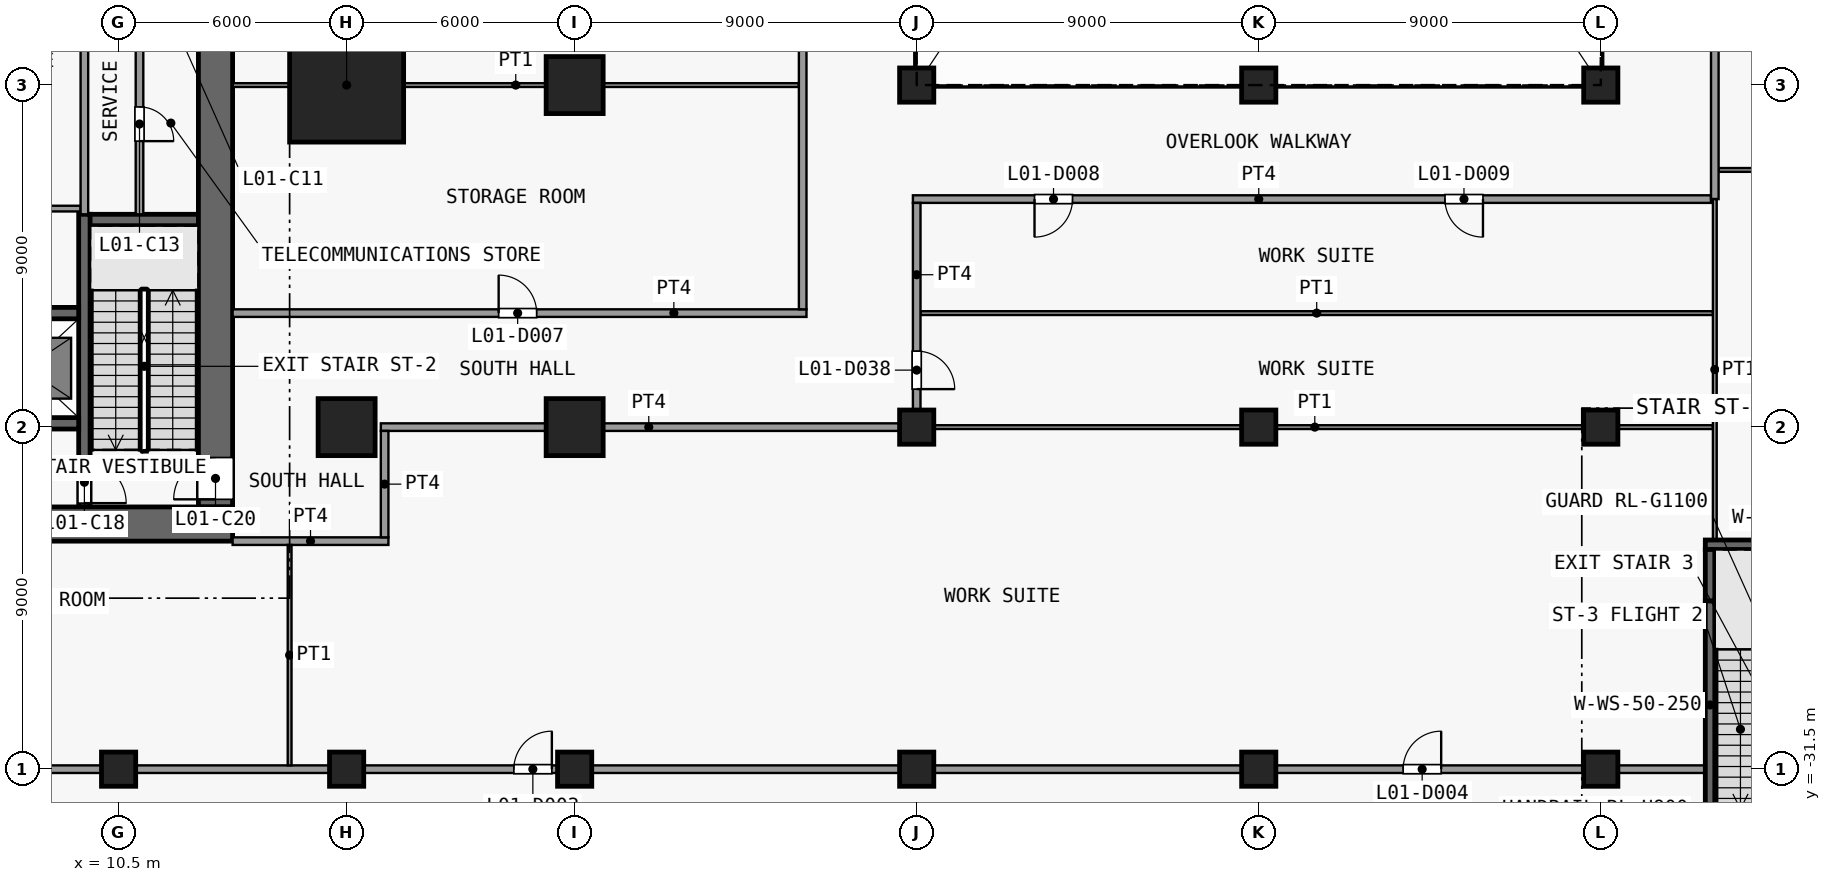
"""IFC4 building model, lengths in metres.
Left out: names, types, materials, properties, quantities, classifications, styles, units other than length and angle.
Written with IfcOpenShell. Run it as: python <this file> out.ifc"""

import sys

from ifc_helpers import new_model, si_unit, direction, frame, frame_2d, origin, origin_2d, place, context, subcontext, project, spatial, rectangle, extrude, element, fill, save


model = new_model("IFC4")
c1 = context("Model", 3, precision=1e-05, world=origin(), true_north=direction((0.0, 1.0)))
c2 = subcontext(c1, "Body", "Model", "MODEL_VIEW")
j1 = project(units=[si_unit("LENGTHUNIT", "METRE"), si_unit("PLANEANGLEUNIT", "RADIAN")], contexts=[c1])
p1 = place(None, origin())
s1 = spatial("IfcSite", under=j1, at=p1, CompositionType="ELEMENT")
p2 = place(p1, origin())
s2 = spatial("IfcBuilding", under=s1, at=p2, CompositionType="ELEMENT")
p3 = place(p2, frame((0.0, 0.0, 8.0)))
s3 = spatial("IfcBuildingStorey", under=s2, at=p3, CompositionType="ELEMENT", Elevation=8.0)
for number, where, z_axis, x_axis in (
    (1, (10.5, -31.5, 0.0), (0.0, 0.0, 1.0), (1.0, 0.0, 0.0)),
    (2, (16.5, -31.5, 0.0), (0.0, 0.0, 1.0), (1.0, 0.0, 0.0)),
):
    element("IfcColumn", number, at=place(p3, frame(where, z_axis=z_axis, x_axis=x_axis)), inside=s3, PredefinedType="COLUMN", context=c2, shape_type="SweptSolid", body=[
        extrude(rectangle(XDim=0.9, YDim=0.9, at=origin_2d()), origin(), (0.0, 0.0, 1.0), 5.5),
    ])
p4 = place(p3, frame((16.5, -22.5, 0.0), z_axis=(0.0, 0.0, 1.0), x_axis=(1.0, 0.0, 0.0)))
e3 = element("IfcColumn", 3, at=p4, inside=s3, PredefinedType="COLUMN", context=c2, shape_type="SweptSolid", body=[
    extrude(rectangle(XDim=1.5, YDim=1.5, at=origin_2d()), origin(), (0.0, 0.0, 1.0), 5.5),
])
p5 = place(p3, frame((16.5, -13.5, 0.0), z_axis=(0.0, 0.0, 1.0), x_axis=(1.0, 0.0, 0.0)))
e4 = element("IfcColumn", 4, at=p5, inside=s3, PredefinedType="COLUMN", context=c2, shape_type="SweptSolid", body=[
    extrude(rectangle(XDim=3.0, YDim=3.0, at=origin_2d()), origin(), (0.0, 0.0, 1.0), 5.5),
])
p6 = place(p3, frame((22.5, -31.5, 0.0), z_axis=(0.0, 0.0, 1.0), x_axis=(1.0, 0.0, 0.0)))
e5 = element("IfcColumn", 5, at=p6, inside=s3, PredefinedType="COLUMN", context=c2, shape_type="SweptSolid", body=[
    extrude(rectangle(XDim=0.9, YDim=0.9, at=origin_2d()), origin(), (0.0, 0.0, 1.0), 5.5),
])
for number, where, z_axis, x_axis in (
    (6, (22.5, -22.5, 0.0), (0.0, 0.0, 1.0), (1.0, 0.0, 0.0)),
    (7, (22.5, -13.5, 0.0), (0.0, 0.0, 1.0), (1.0, 0.0, 0.0)),
):
    element("IfcColumn", number, at=place(p3, frame(where, z_axis=z_axis, x_axis=x_axis)), inside=s3, PredefinedType="COLUMN", context=c2, shape_type="SweptSolid", body=[
        extrude(rectangle(XDim=1.5, YDim=1.5, at=origin_2d()), origin(), (0.0, 0.0, 1.0), 5.5),
    ])
for number, where, z_axis, x_axis in (
    (8, (31.5, -31.5, 0.0), (0.0, 0.0, 1.0), (1.0, 0.0, 0.0)),
    (9, (31.5, -22.5, 0.0), (0.0, 0.0, 1.0), (1.0, 0.0, 0.0)),
    (10, (31.5, -13.5, 0.0), (0.0, 0.0, 1.0), (1.0, 0.0, 0.0)),
    (11, (40.5, -31.5, 0.0), (0.0, 0.0, 1.0), (1.0, 0.0, 0.0)),
    (12, (40.5, -22.5, 0.0), (0.0, 0.0, 1.0), (1.0, 0.0, 0.0)),
    (13, (40.5, -13.5, 0.0), (0.0, 0.0, 1.0), (1.0, 0.0, 0.0)),
    (14, (49.5, -31.5, 0.0), (0.0, 0.0, 1.0), (1.0, 0.0, 0.0)),
    (15, (49.5, -22.5, 0.0), (0.0, 0.0, 1.0), (1.0, 0.0, 0.0)),
    (16, (49.5, -13.5, 0.0), (0.0, 0.0, 1.0), (1.0, 0.0, 0.0)),
):
    element("IfcColumn", number, at=place(p3, frame(where, z_axis=z_axis, x_axis=x_axis)), inside=s3, PredefinedType="COLUMN", context=c2, shape_type="SweptSolid", body=[
        extrude(rectangle(XDim=0.9, YDim=0.9, at=origin_2d()), origin(), (0.0, 0.0, 1.0), 5.5),
    ])
p7 = place(p3, frame((-13.5, -25.05, 0.0), z_axis=(0.0, 0.0, 1.0), x_axis=(1.0, 0.0, 0.0)))
e17 = element("IfcWall", 17, at=p7, inside=s3, PredefinedType="SHEAR", context=c2, shape_type="SweptSolid", body=[
    extrude(rectangle(XDim=27.0, YDim=0.9, at=frame_2d((13.5, 0.0))), origin(), (0.0, 0.0, 1.0), 5.15),
])
p8 = place(p3, frame((13.05, -24.6, 0.0), z_axis=(0.0, 0.0, 1.0), x_axis=(0.0, 1.0, 0.0)))
e18 = element("IfcWall", 18, at=p8, inside=s3, PredefinedType="SHEAR", context=c2, shape_type="SweptSolid", body=[
    extrude(rectangle(XDim=16.1, YDim=0.9, at=frame_2d((8.05, 0.0))), origin(), (0.0, 0.0, 1.0), 5.15),
])
p9 = place(p8, frame((0.2, 0.0, 0.0)))
e19 = element("IfcOpeningElement", 19, at=p9, cuts=e18, PredefinedType="OPENING", context=c2, shape_type="SweptSolid", body=[
    extrude(rectangle(XDim=1.1, YDim=2.1, at=frame_2d((0.55, 1.05))), frame((0.0, 0.46, 0.0), z_axis=(0.0, -1.0, 0.0), x_axis=(1.0, 0.0, 0.0)), (0.0, 0.0, 1.0), 0.92),
])
p10 = place(p3, frame((6.35, -22.4, 0.0), z_axis=(0.0, 0.0, 1.0), x_axis=(1.0, 0.0, 0.0)))
e20 = element("IfcWall", 20, at=p10, inside=s3, PredefinedType="SHEAR", context=c2, shape_type="SweptSolid", body=[
    extrude(rectangle(XDim=3.1, YDim=0.3, at=frame_2d((1.55, 0.0))), origin(), (0.0, 0.0, 1.0), 5.15),
])
p11 = place(p3, frame((6.425, -19.5, 0.0), z_axis=(0.0, 0.0, 1.0), x_axis=(1.0, 0.0, 0.0)))
e21 = element("IfcWall", 21, at=p11, inside=s3, PredefinedType="SHEAR", context=c2, shape_type="SweptSolid", body=[
    extrude(rectangle(XDim=3.025, YDim=0.3, at=frame_2d((1.512, 0.0))), origin(), (0.0, 0.0, 1.0), 5.15),
])
p12 = place(p3, frame((9.5, -17.05, 0.0), z_axis=(0.0, 0.0, 1.0), x_axis=(1.0, 0.0, 0.0)))
e22 = element("IfcWall", 22, at=p12, inside=s3, PredefinedType="SHEAR", context=c2, shape_type="SweptSolid", body=[
    extrude(rectangle(XDim=3.1, YDim=0.3, at=frame_2d((1.55, 0.0))), origin(), (0.0, 0.0, 1.0), 5.15),
])
p13 = place(p3, frame((6.575, -16.75, 0.0), z_axis=(0.0, 0.0, 1.0), x_axis=(1.0, 0.0, 0.0)))
e23 = element("IfcWall", 23, at=p13, inside=s3, PredefinedType="PARTITIONING", context=c2, shape_type="SweptSolid", body=[
    extrude(rectangle(XDim=2.925, YDim=0.15, at=frame_2d((1.462, 0.0))), origin(), (0.0, 0.0, 1.0), 5.15),
])
p14 = place(p3, frame((9.6, -16.9, 0.0), z_axis=(0.0, 0.0, 1.0), x_axis=(0.0, -1.0, 0.0)))
e24 = element("IfcWall", 24, at=p14, inside=s3, PredefinedType="SHEAR", context=c2, shape_type="SweptSolid", body=[
    extrude(rectangle(XDim=7.7, YDim=0.3, at=frame_2d((3.85, 0.0))), origin(), (0.0, 0.0, 1.0), 5.15),
])
p15 = place(p14, frame((6.5, 0.0, 0.0)))
e25 = element("IfcOpeningElement", 25, at=p15, cuts=e24, PredefinedType="OPENING", context=c2, shape_type="SweptSolid", body=[
    extrude(rectangle(XDim=1.1, YDim=2.1, at=frame_2d((0.55, 1.05))), frame((0.0, 0.16, 0.0), z_axis=(0.0, -1.0, 0.0), x_axis=(1.0, 0.0, 0.0)), (0.0, 0.0, 1.0), 0.32),
])
p16 = place(p3, frame((9.6, -16.9, 0.0), z_axis=(0.0, 0.0, 1.0), x_axis=(0.0, 1.0, 0.0)))
e26 = element("IfcWall", 26, at=p16, inside=s3, PredefinedType="PARTITIONING", context=c2, shape_type="SweptSolid", body=[
    extrude(rectangle(XDim=8.4, YDim=0.2, at=frame_2d((4.2, 0.0))), origin(), (0.0, 0.0, 1.0), 5.15),
])
p17 = place(p3, frame((11.05, -11.9, 0.0), z_axis=(0.0, 0.0, 1.0), x_axis=(0.0, -1.0, 0.0)))
e27 = element("IfcWall", 27, at=p17, inside=s3, PredefinedType="PARTITIONING", context=c2, shape_type="SweptSolid", body=[
    extrude(rectangle(XDim=5.0, YDim=0.2, at=frame_2d((2.5, 0.0))), origin(), (0.0, 0.0, 1.0), 5.15),
])
p18 = place(p17, frame((2.175, 0.0, 0.0)))
e28 = element("IfcOpeningElement", 28, at=p18, cuts=e27, PredefinedType="OPENING", context=c2, shape_type="SweptSolid", body=[
    extrude(rectangle(XDim=0.9, YDim=2.1, at=frame_2d((0.45, 1.05))), frame((0.0, 0.11, 0.0), z_axis=(0.0, -1.0, 0.0), x_axis=(1.0, 0.0, 0.0)), (0.0, 0.0, 1.0), 0.22),
])
p19 = place(p3, frame((52.375, -32.55, 0.0), z_axis=(0.0, 0.0, 1.0), x_axis=(0.0, 1.0, 0.0)))
e29 = element("IfcWall", 29, at=p19, inside=s3, PredefinedType="SHEAR", context=c2, shape_type="SweptSolid", body=[
    extrude(rectangle(XDim=5.48, YDim=0.25, at=frame_2d((2.74, 0.0))), origin(), (0.0, 0.0, 1.0), 5.15),
])
p20 = place(p3, frame((52.375, -27.07, 0.0), z_axis=(0.0, 0.0, 1.0), x_axis=(0.0, 1.0, 0.0)))
e30 = element("IfcWall", 30, at=p20, inside=s3, PredefinedType="SHEAR", context=c2, shape_type="SweptSolid", body=[
    extrude(rectangle(XDim=1.35, YDim=0.25, at=frame_2d((0.675, 0.0))), origin(), (0.0, 0.0, 1.0), 5.15),
])
p21 = place(p3, frame((52.25, -25.595, 0.0), z_axis=(0.0, 0.0, 1.0), x_axis=(1.0, 0.0, 0.0)))
e31 = element("IfcWall", 31, at=p21, inside=s3, PredefinedType="SHEAR", context=c2, shape_type="SweptSolid", body=[
    extrude(rectangle(XDim=3.35, YDim=0.25, at=frame_2d((1.675, 0.0))), origin(), (0.0, 0.0, 1.0), 5.15),
])
p22 = place(p3, frame((-25.9, -31.5, 0.0), z_axis=(0.0, 0.0, 1.0), x_axis=(1.0, 0.0, 0.0)))
e32 = element("IfcWall", 32, at=p22, inside=s3, PredefinedType="PARTITIONING", context=c2, shape_type="SweptSolid", body=[
    extrude(rectangle(XDim=78.15, YDim=0.2, at=frame_2d((39.075, 0.0))), origin(), (0.0, 0.0, 1.0), 5.15),
])
p23 = place(p22, frame((7.0, 0.0, 0.0)))
e33 = element("IfcOpeningElement", 33, at=p23, cuts=e32, PredefinedType="OPENING", context=c2, shape_type="SweptSolid", body=[
    extrude(rectangle(XDim=1.8, YDim=2.1, at=frame_2d((0.9, 1.05))), frame((0.0, 0.11, 0.0), z_axis=(0.0, -1.0, 0.0), x_axis=(1.0, 0.0, 0.0)), (0.0, 0.0, 1.0), 0.22),
])
p24 = place(p22, frame((31.8, 0.0, 0.0)))
e34 = element("IfcOpeningElement", 34, at=p24, cuts=e32, PredefinedType="OPENING", context=c2, shape_type="SweptSolid", body=[
    extrude(rectangle(XDim=1.8, YDim=2.1, at=frame_2d((0.9, 1.05))), frame((0.0, 0.11, 0.0), z_axis=(0.0, -1.0, 0.0), x_axis=(1.0, 0.0, 0.0)), (0.0, 0.0, 1.0), 0.22),
])
p25 = place(p22, frame((46.8, 0.0, 0.0)))
e35 = element("IfcOpeningElement", 35, at=p25, cuts=e32, PredefinedType="OPENING", context=c2, shape_type="SweptSolid", body=[
    extrude(rectangle(XDim=1.0, YDim=2.1, at=frame_2d((0.5, 1.05))), frame((0.0, 0.11, 0.0), z_axis=(0.0, -1.0, 0.0), x_axis=(1.0, 0.0, 0.0)), (0.0, 0.0, 1.0), 0.22),
])
p26 = place(p22, frame((70.2, 0.0, 0.0)))
e36 = element("IfcOpeningElement", 36, at=p26, cuts=e32, PredefinedType="OPENING", context=c2, shape_type="SweptSolid", body=[
    extrude(rectangle(XDim=1.0, YDim=2.1, at=frame_2d((0.5, 1.05))), frame((0.0, 0.11, 0.0), z_axis=(0.0, -1.0, 0.0), x_axis=(1.0, 0.0, 0.0)), (0.0, 0.0, 1.0), 0.22),
])
p27 = place(p3, frame((13.5, -25.5, 0.0), z_axis=(0.0, 0.0, 1.0), x_axis=(1.0, 0.0, 0.0)))
e37 = element("IfcWall", 37, at=p27, inside=s3, PredefinedType="PARTITIONING", context=c2, shape_type="SweptSolid", body=[
    extrude(rectangle(XDim=4.1, YDim=0.2, at=frame_2d((2.05, 0.0))), origin(), (0.0, 0.0, 1.0), 5.15),
])
p28 = place(p3, frame((17.4, -22.5, 0.0), z_axis=(0.0, 0.0, 1.0), x_axis=(1.0, 0.0, 0.0)))
e38 = element("IfcWall", 38, at=p28, inside=s3, PredefinedType="PARTITIONING", context=c2, shape_type="SweptSolid", body=[
    extrude(rectangle(XDim=14.1, YDim=0.2, at=frame_2d((7.05, 0.0))), origin(), (0.0, 0.0, 1.0), 5.15),
])
p29 = place(p3, frame((31.5, -22.5, 0.0), z_axis=(0.0, 0.0, 1.0), x_axis=(1.0, 0.0, 0.0)))
e39 = element("IfcWall", 39, at=p29, inside=s3, PredefinedType="PARTITIONING", context=c2, shape_type="SweptSolid", body=[
    extrude(rectangle(XDim=20.95, YDim=0.1, at=frame_2d((10.475, 0.0))), origin(), (0.0, 0.0, 1.0), 5.15),
])
p30 = place(p3, frame((13.5, -19.5, 0.0), z_axis=(0.0, 0.0, 1.0), x_axis=(1.0, 0.0, 0.0)))
e40 = element("IfcWall", 40, at=p30, inside=s3, PredefinedType="PARTITIONING", context=c2, shape_type="SweptSolid", body=[
    extrude(rectangle(XDim=15.1, YDim=0.2, at=frame_2d((7.55, 0.0))), origin(), (0.0, 0.0, 1.0), 5.15),
])
p31 = place(p30, frame((7.0, 0.0, 0.0)))
e41 = element("IfcOpeningElement", 41, at=p31, cuts=e40, PredefinedType="OPENING", context=c2, shape_type="SweptSolid", body=[
    extrude(rectangle(XDim=1.0, YDim=2.1, at=frame_2d((0.5, 1.05))), frame((0.0, 0.11, 0.0), z_axis=(0.0, -1.0, 0.0), x_axis=(1.0, 0.0, 0.0)), (0.0, 0.0, 1.0), 0.22),
])
p32 = place(p3, frame((31.6, -19.5, 0.0), z_axis=(0.0, 0.0, 1.0), x_axis=(1.0, 0.0, 0.0)))
e42 = element("IfcWall", 42, at=p32, inside=s3, PredefinedType="PARTITIONING", context=c2, shape_type="SweptSolid", body=[
    extrude(rectangle(XDim=20.85, YDim=0.1, at=frame_2d((10.425, 0.0))), origin(), (0.0, 0.0, 1.0), 5.15),
])
p33 = place(p3, frame((31.4, -16.5, 0.0), z_axis=(0.0, 0.0, 1.0), x_axis=(1.0, 0.0, 0.0)))
e43 = element("IfcWall", 43, at=p33, inside=s3, PredefinedType="PARTITIONING", context=c2, shape_type="SweptSolid", body=[
    extrude(rectangle(XDim=21.0, YDim=0.2, at=frame_2d((10.5, 0.0))), origin(), (0.0, 0.0, 1.0), 5.15),
])
p34 = place(p33, frame((3.2, 0.0, 0.0)))
e44 = element("IfcOpeningElement", 44, at=p34, cuts=e43, PredefinedType="OPENING", context=c2, shape_type="SweptSolid", body=[
    extrude(rectangle(XDim=1.0, YDim=2.1, at=frame_2d((0.5, 1.05))), frame((0.0, 0.11, 0.0), z_axis=(0.0, -1.0, 0.0), x_axis=(1.0, 0.0, 0.0)), (0.0, 0.0, 1.0), 0.22),
])
p35 = place(p33, frame((14.0, 0.0, 0.0)))
e45 = element("IfcOpeningElement", 45, at=p35, cuts=e43, PredefinedType="OPENING", context=c2, shape_type="SweptSolid", body=[
    extrude(rectangle(XDim=1.0, YDim=2.1, at=frame_2d((0.5, 1.05))), frame((0.0, 0.11, 0.0), z_axis=(0.0, -1.0, 0.0), x_axis=(1.0, 0.0, 0.0)), (0.0, 0.0, 1.0), 0.22),
])
p36 = place(p3, frame((52.6, -15.733, 0.0), z_axis=(0.0, 0.0, 1.0), x_axis=(1.0, 0.0, 0.0)))
e46 = element("IfcWall", 46, at=p36, inside=s3, PredefinedType="PARTITIONING", context=c2, shape_type="SweptSolid", body=[
    extrude(rectangle(XDim=5.8, YDim=0.1, at=frame_2d((2.9, 0.0))), origin(), (0.0, 0.0, 1.0), 5.15),
])
p37 = place(p3, frame((13.5, -13.5, 0.0), z_axis=(0.0, 0.0, 1.0), x_axis=(1.0, 0.0, 0.0)))
e47 = element("IfcWall", 47, at=p37, inside=s3, PredefinedType="PARTITIONING", context=c2, shape_type="SweptSolid", body=[
    extrude(rectangle(XDim=14.9, YDim=0.1, at=frame_2d((7.45, 0.0))), origin(), (0.0, 0.0, 1.0), 5.15),
])
p38 = place(p3, frame((15.0, -31.4, 0.0), z_axis=(0.0, 0.0, 1.0), x_axis=(0.0, 1.0, 0.0)))
e48 = element("IfcWall", 48, at=p38, inside=s3, PredefinedType="PARTITIONING", context=c2, shape_type="SweptSolid", body=[
    extrude(rectangle(XDim=5.8, YDim=0.1, at=frame_2d((2.9, 0.0))), origin(), (0.0, 0.0, 1.0), 5.15),
])
p39 = place(p3, frame((17.5, -25.4, 0.0), z_axis=(0.0, 0.0, 1.0), x_axis=(0.0, 1.0, 0.0)))
e49 = element("IfcWall", 49, at=p39, inside=s3, PredefinedType="PARTITIONING", context=c2, shape_type="SweptSolid", body=[
    extrude(rectangle(XDim=2.8, YDim=0.2, at=frame_2d((1.4, 0.0))), origin(), (0.0, 0.0, 1.0), 5.15),
])
p40 = place(p3, frame((28.5, -19.4, 0.0), z_axis=(0.0, 0.0, 1.0), x_axis=(0.0, 1.0, 0.0)))
e50 = element("IfcWall", 50, at=p40, inside=s3, PredefinedType="PARTITIONING", context=c2, shape_type="SweptSolid", body=[
    extrude(rectangle(XDim=14.8, YDim=0.2, at=frame_2d((7.4, 0.0))), origin(), (0.0, 0.0, 1.0), 5.15),
])
p41 = place(p3, frame((31.5, -22.4, 0.0), z_axis=(0.0, 0.0, 1.0), x_axis=(0.0, 1.0, 0.0)))
e51 = element("IfcWall", 51, at=p41, inside=s3, PredefinedType="PARTITIONING", context=c2, shape_type="SweptSolid", body=[
    extrude(rectangle(XDim=5.8, YDim=0.2, at=frame_2d((2.9, 0.0))), origin(), (0.0, 0.0, 1.0), 5.15),
])
p42 = place(p41, frame((0.9, 0.0, 0.0)))
e52 = element("IfcOpeningElement", 52, at=p42, cuts=e51, PredefinedType="OPENING", context=c2, shape_type="SweptSolid", body=[
    extrude(rectangle(XDim=1.0, YDim=2.1, at=frame_2d((0.5, 1.05))), frame((0.0, 0.11, 0.0), z_axis=(0.0, -1.0, 0.0), x_axis=(1.0, 0.0, 0.0)), (0.0, 0.0, 1.0), 0.22),
])
p43 = place(p3, frame((52.5, -16.5, 0.0), z_axis=(0.0, 0.0, 1.0), x_axis=(0.0, 1.0, 0.0)))
e53 = element("IfcWall", 53, at=p43, inside=s3, PredefinedType="PARTITIONING", context=c2, shape_type="SweptSolid", body=[
    extrude(rectangle(XDim=32.2, YDim=0.2, at=frame_2d((16.1, 0.0))), origin(), (0.0, 0.0, 1.0), 5.15),
])
p44 = place(p3, frame((52.5, -25.47, 0.0), z_axis=(0.0, 0.0, 1.0), x_axis=(0.0, 1.0, 0.0)))
e54 = element("IfcWall", 54, at=p44, inside=s3, PredefinedType="PARTITIONING", context=c2, shape_type="SweptSolid", body=[
    extrude(rectangle(XDim=8.97, YDim=0.1, at=frame_2d((4.485, 0.0))), origin(), (0.0, 0.0, 1.0), 5.15),
])
p45 = place(p18, origin())
e55 = element("IfcDoor", 55, at=p45, inside=s3, OperationType="SINGLE_SWING_RIGHT", PredefinedType="DOOR", context=c2, shape_type="SweptSolid", body=[
    extrude(rectangle(XDim=0.9, YDim=2.1, at=frame_2d((0.45, 1.05))), frame((0.0, 0.025, 0.0), z_axis=(0.0, -1.0, 0.0), x_axis=(1.0, 0.0, 0.0)), (0.0, 0.0, 1.0), 0.05),
])
fill(e28, e55)
p46 = place(p15, origin())
e56 = element("IfcDoor", 56, at=p46, inside=s3, OperationType="SINGLE_SWING_RIGHT", PredefinedType="DOOR", context=c2, shape_type="SweptSolid", body=[
    extrude(rectangle(XDim=1.1, YDim=2.1, at=frame_2d((0.55, 1.05))), frame((0.0, 0.025, 0.0), z_axis=(0.0, -1.0, 0.0), x_axis=(1.0, 0.0, 0.0)), (0.0, 0.0, 1.0), 0.05),
])
fill(e25, e56)
p47 = place(p9, origin())
e57 = element("IfcDoor", 57, at=p47, inside=s3, OperationType="SINGLE_SWING_LEFT", PredefinedType="DOOR", context=c2, shape_type="SweptSolid", body=[
    extrude(rectangle(XDim=1.1, YDim=2.1, at=frame_2d((0.55, 1.05))), frame((0.0, 0.025, 0.0), z_axis=(0.0, -1.0, 0.0), x_axis=(1.0, 0.0, 0.0)), (0.0, 0.0, 1.0), 0.05),
])
fill(e19, e57)
p48 = place(p25, origin())
e58 = element("IfcDoor", 58, at=p48, inside=s3, OperationType="SINGLE_SWING_LEFT", PredefinedType="DOOR", context=c2, shape_type="SweptSolid", body=[
    extrude(rectangle(XDim=1.0, YDim=2.1, at=frame_2d((0.5, 1.05))), frame((0.0, 0.025, 0.0), z_axis=(0.0, -1.0, 0.0), x_axis=(1.0, 0.0, 0.0)), (0.0, 0.0, 1.0), 0.05),
])
fill(e35, e58)
p49 = place(p26, origin())
e59 = element("IfcDoor", 59, at=p49, inside=s3, OperationType="SINGLE_SWING_LEFT", PredefinedType="DOOR", context=c2, shape_type="SweptSolid", body=[
    extrude(rectangle(XDim=1.0, YDim=2.1, at=frame_2d((0.5, 1.05))), frame((0.0, 0.025, 0.0), z_axis=(0.0, -1.0, 0.0), x_axis=(1.0, 0.0, 0.0)), (0.0, 0.0, 1.0), 0.05),
])
fill(e36, e59)
p50 = place(p31, origin())
e60 = element("IfcDoor", 60, at=p50, inside=s3, OperationType="SINGLE_SWING_RIGHT", PredefinedType="DOOR", context=c2, shape_type="SweptSolid", body=[
    extrude(rectangle(XDim=1.0, YDim=2.1, at=frame_2d((0.5, 1.05))), frame((0.0, 0.025, 0.0), z_axis=(0.0, -1.0, 0.0), x_axis=(1.0, 0.0, 0.0)), (0.0, 0.0, 1.0), 0.05),
])
fill(e41, e60)
p51 = place(p34, origin())
e61 = element("IfcDoor", 61, at=p51, inside=s3, OperationType="SINGLE_SWING_LEFT", PredefinedType="DOOR", context=c2, shape_type="SweptSolid", body=[
    extrude(rectangle(XDim=1.0, YDim=2.1, at=frame_2d((0.5, 1.05))), frame((0.0, 0.025, 0.0), z_axis=(0.0, -1.0, 0.0), x_axis=(1.0, 0.0, 0.0)), (0.0, 0.0, 1.0), 0.05),
])
fill(e44, e61)
p52 = place(p35, origin())
e62 = element("IfcDoor", 62, at=p52, inside=s3, OperationType="SINGLE_SWING_RIGHT", PredefinedType="DOOR", context=c2, shape_type="SweptSolid", body=[
    extrude(rectangle(XDim=1.0, YDim=2.1, at=frame_2d((0.5, 1.05))), frame((0.0, 0.025, 0.0), z_axis=(0.0, -1.0, 0.0), x_axis=(1.0, 0.0, 0.0)), (0.0, 0.0, 1.0), 0.05),
])
fill(e45, e62)
p53 = place(p42, origin())
e63 = element("IfcDoor", 63, at=p53, inside=s3, OperationType="SINGLE_SWING_LEFT", PredefinedType="DOOR", context=c2, shape_type="SweptSolid", body=[
    extrude(rectangle(XDim=1.0, YDim=2.1, at=frame_2d((0.5, 1.05))), frame((0.0, 0.025, 0.0), z_axis=(0.0, -1.0, 0.0), x_axis=(1.0, 0.0, 0.0)), (0.0, 0.0, 1.0), 0.05),
])
fill(e52, e63)
save(model, sys.argv[1])
